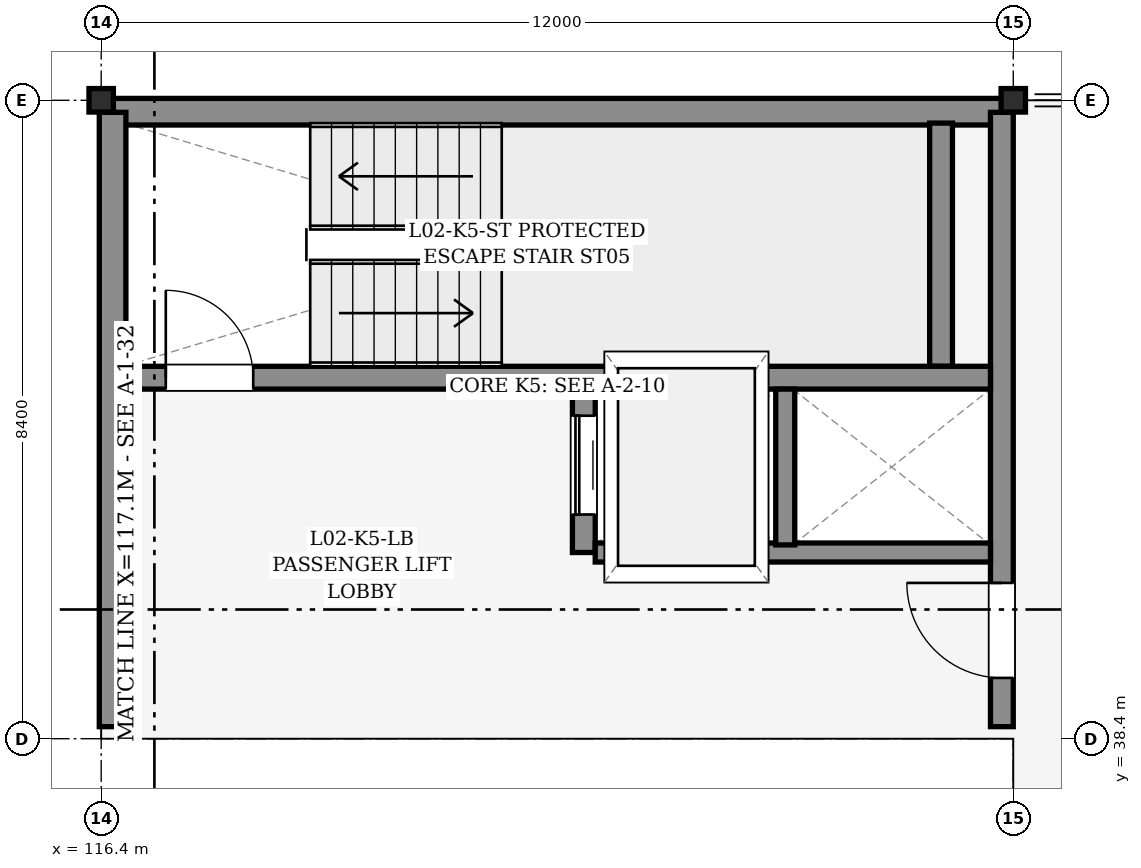
"""IFC4 building model, lengths in metres.
Left out: names, types, materials, properties, quantities, classifications, styles, units other than length and angle.
Written with IfcOpenShell. Run it as: python <this file> out.ifc"""

import sys

from ifc_helpers import new_model, si_unit, direction, frame, frame_2d, origin, origin_2d, place, context, subcontext, project, spatial, rectangle, i_section, extrude, element, fill, save


model = new_model("IFC4")
c1 = context("Model", 3, precision=1e-05, world=origin(), true_north=direction((0.0, 1.0)))
c2 = subcontext(c1, "Body", "Model", "MODEL_VIEW")
j1 = project(units=[si_unit("LENGTHUNIT", "METRE"), si_unit("PLANEANGLEUNIT", "RADIAN")], contexts=[c1])
p1 = place(None, origin())
s1 = spatial("IfcSite", under=j1, at=p1, CompositionType="ELEMENT")
p2 = place(p1, origin())
s2 = spatial("IfcBuilding", under=s1, at=p2, CompositionType="ELEMENT")
p3 = place(p2, frame((0.0, 0.0, 9.0)))
s3 = spatial("IfcBuildingStorey", under=s2, at=p3, CompositionType="ELEMENT", Elevation=9.0)
for number, where, z_axis, x_axis in (
    (1, (116.4, 38.4, 0.0), (0.0, 0.0, 1.0), (1.0, 0.0, 0.0)),
    (2, (116.4, 46.8, 0.0), (0.0, 0.0, 1.0), (1.0, 0.0, 0.0)),
    (3, (128.4, 38.4, 0.0), (0.0, 0.0, 1.0), (1.0, 0.0, 0.0)),
    (4, (128.4, 46.8, 0.0), (0.0, 0.0, 1.0), (1.0, 0.0, 0.0)),
):
    element("IfcColumn", number, at=place(p3, frame(where, z_axis=z_axis, x_axis=x_axis)), inside=s3, PredefinedType="COLUMN", context=c2, shape_type="SweptSolid", body=[
        extrude(i_section(OverallWidth=0.309, OverallDepth=0.321, WebThickness=0.014, FlangeThickness=0.022, FilletRadius=0.015, at=origin_2d()), origin(), (0.0, 0.0, 1.0), 3.6),
    ])
p4 = place(p3, frame((116.552, 46.65, 0.0), z_axis=(0.0, 0.0, 1.0), x_axis=(1.0, 0.0, 0.0)))
e5 = element("IfcWall", 5, at=p4, inside=s3, PredefinedType="SHEAR", context=c2, shape_type="SweptSolid", body=[
    extrude(rectangle(XDim=11.695, YDim=0.35, at=frame_2d((5.848, 0.0))), origin(), (0.0, 0.0, 1.0), 3.38),
])
p5 = place(p3, frame((116.552, 38.55, 0.0), z_axis=(0.0, 0.0, 1.0), x_axis=(1.0, 0.0, 0.0)))
e6 = element("IfcWall", 6, at=p5, inside=s3, PredefinedType="SHEAR", context=c2, shape_type="SweptSolid", body=[
    extrude(rectangle(XDim=11.695, YDim=0.3, at=frame_2d((5.848, 0.0))), origin(), (0.0, 0.0, 1.0), 3.38),
])
p6 = place(p3, frame((116.55, 38.559, 0.0), z_axis=(0.0, 0.0, 1.0), x_axis=(0.0, 1.0, 0.0)))
e7 = element("IfcWall", 7, at=p6, inside=s3, PredefinedType="SHEAR", context=c2, shape_type="SweptSolid", body=[
    extrude(rectangle(XDim=8.083, YDim=0.35, at=frame_2d((4.042, 0.0))), origin(), (0.0, 0.0, 1.0), 3.38),
])
p7 = place(p3, frame((128.25, 38.559, 0.0), z_axis=(0.0, 0.0, 1.0), x_axis=(0.0, 1.0, 0.0)))
e8 = element("IfcWall", 8, at=p7, inside=s3, PredefinedType="SHEAR", context=c2, shape_type="SweptSolid", body=[
    extrude(rectangle(XDim=8.083, YDim=0.3, at=frame_2d((4.042, 0.0))), origin(), (0.0, 0.0, 1.0), 3.38),
])
p8 = place(p7, frame((0.642, 0.0, 0.0)))
e9 = element("IfcOpeningElement", 9, at=p8, cuts=e8, PredefinedType="OPENING", context=c2, shape_type="SweptSolid", body=[
    extrude(rectangle(XDim=1.25, YDim=2.15, at=frame_2d((0.625, 1.075))), frame((0.0, 0.16, 0.0), z_axis=(0.0, -1.0, 0.0), x_axis=(1.0, 0.0, 0.0)), (0.0, 0.0, 1.0), 0.32),
])
p9 = place(p3, frame((127.45, 43.3, 0.0), z_axis=(0.0, 0.0, 1.0), x_axis=(0.0, 1.0, 0.0)))
e10 = element("IfcWall", 10, at=p9, inside=s3, PredefinedType="SHEAR", context=c2, shape_type="SweptSolid", body=[
    extrude(rectangle(XDim=3.2, YDim=0.3, at=frame_2d((1.6, 0.0))), origin(), (0.0, 0.0, 1.0), 3.38),
])
p10 = place(p3, frame((116.7, 43.15, 0.0), z_axis=(0.0, 0.0, 1.0), x_axis=(1.0, 0.0, 0.0)))
e11 = element("IfcWall", 11, at=p10, inside=s3, PredefinedType="SHEAR", context=c2, shape_type="SweptSolid", body=[
    extrude(rectangle(XDim=11.4, YDim=0.3, at=frame_2d((5.7, 0.0))), origin(), (0.0, 0.0, 1.0), 3.38),
])
p11 = place(p10, frame((0.55, 0.0, 0.0)))
e12 = element("IfcOpeningElement", 12, at=p11, cuts=e11, PredefinedType="OPENING", context=c2, shape_type="SweptSolid", body=[
    extrude(rectangle(XDim=1.15, YDim=2.15, at=frame_2d((0.575, 1.075))), frame((0.0, 0.16, 0.0), z_axis=(0.0, -1.0, 0.0), x_axis=(1.0, 0.0, 0.0)), (0.0, 0.0, 1.0), 0.32),
])
p12 = place(p3, frame((122.75, 40.85, 0.0), z_axis=(0.0, 0.0, 1.0), x_axis=(0.0, 1.0, 0.0)))
e13 = element("IfcWall", 13, at=p12, inside=s3, PredefinedType="SHEAR", context=c2, shape_type="SweptSolid", body=[
    extrude(rectangle(XDim=2.15, YDim=0.3, at=frame_2d((1.075, 0.0))), origin(), (0.0, 0.0, 1.0), 3.38),
])
p13 = place(p12, frame((0.5, 0.0, 0.0)))
e14 = element("IfcOpeningElement", 14, at=p13, cuts=e13, PredefinedType="OPENING", context=c2, shape_type="SweptSolid", body=[
    extrude(rectangle(XDim=1.3, YDim=2.3, at=frame_2d((0.65, 1.15))), frame((0.0, 0.16, 0.0), z_axis=(0.0, -1.0, 0.0), x_axis=(1.0, 0.0, 0.0)), (0.0, 0.0, 1.0), 0.32),
])
p14 = place(p3, frame((122.9, 40.85, 0.0), z_axis=(0.0, 0.0, 1.0), x_axis=(1.0, 0.0, 0.0)))
e15 = element("IfcWall", 15, at=p14, inside=s3, PredefinedType="PARTITIONING", context=c2, shape_type="SweptSolid", body=[
    extrude(rectangle(XDim=5.2, YDim=0.25, at=frame_2d((2.6, 0.0))), origin(), (0.0, 0.0, 1.0), 2.525),
])
p15 = place(p3, frame((125.4, 40.95, 0.0), z_axis=(0.0, 0.0, 1.0), x_axis=(0.0, 1.0, 0.0)))
e16 = element("IfcWall", 16, at=p15, inside=s3, PredefinedType="PARTITIONING", context=c2, shape_type="SweptSolid", body=[
    extrude(rectangle(XDim=2.05, YDim=0.25, at=frame_2d((1.025, 0.0))), origin(), (0.0, 0.0, 1.0), 2.525),
])
p16 = place(p8, origin())
e17 = element("IfcDoor", 17, at=p16, inside=s3, OperationType="SINGLE_SWING_RIGHT", PredefinedType="DOOR", context=c2, shape_type="SweptSolid", body=[
    extrude(rectangle(XDim=1.25, YDim=2.15, at=frame_2d((0.625, 1.075))), frame((0.0, 0.025, 0.0), z_axis=(0.0, -1.0, 0.0), x_axis=(1.0, 0.0, 0.0)), (0.0, 0.0, 1.0), 0.05),
])
fill(e9, e17)
p17 = place(p11, origin())
e18 = element("IfcDoor", 18, at=p17, inside=s3, OperationType="SINGLE_SWING_LEFT", PredefinedType="DOOR", context=c2, shape_type="SweptSolid", body=[
    extrude(rectangle(XDim=1.15, YDim=2.15, at=frame_2d((0.575, 1.075))), frame((0.0, 0.025, 0.0), z_axis=(0.0, -1.0, 0.0), x_axis=(1.0, 0.0, 0.0)), (0.0, 0.0, 1.0), 0.05),
])
fill(e12, e18)
p18 = place(p13, origin())
e19 = element("IfcDoor", 19, at=p18, inside=s3, OperationType="SLIDING_TO_LEFT", PredefinedType="DOOR", context=c2, shape_type="SweptSolid", body=[
    extrude(rectangle(XDim=1.3, YDim=2.3, at=frame_2d((0.65, 1.15))), frame((0.0, 0.025, 0.0), z_axis=(0.0, -1.0, 0.0), x_axis=(1.0, 0.0, 0.0)), (0.0, 0.0, 1.0), 0.05),
])
fill(e14, e19)
save(model, sys.argv[1])
